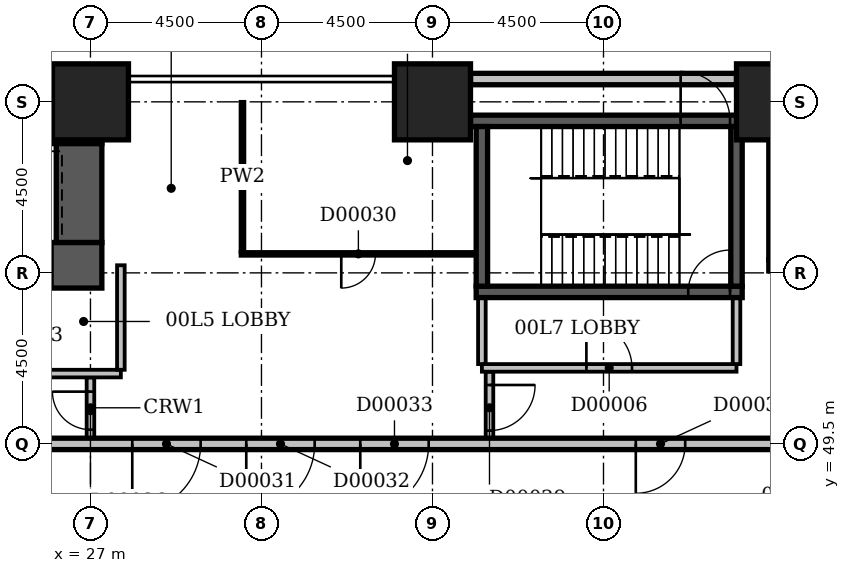
"""IFC4 building model, lengths in metres.
Left out: names, types, materials, properties, quantities, classifications, styles, units other than length and angle.
Written with IfcOpenShell. Run it as: python <this file> out.ifc"""

import sys

from ifc_helpers import new_model, si_unit, direction, frame, frame_2d, origin, origin_2d, place, context, subcontext, project, spatial, rectangle, extrude, element, fill, save


model = new_model("IFC4")
c1 = context("Model", 3, precision=1e-05, world=origin(), true_north=direction((0.0, 1.0)))
c2 = subcontext(c1, "Body", "Model", "MODEL_VIEW")
j1 = project(units=[si_unit("LENGTHUNIT", "METRE"), si_unit("PLANEANGLEUNIT", "RADIAN")], contexts=[c1])
p1 = place(None, origin())
s1 = spatial("IfcSite", under=j1, at=p1, CompositionType="ELEMENT")
p2 = place(p1, origin())
s2 = spatial("IfcBuilding", under=s1, at=p2, CompositionType="ELEMENT")
p3 = place(p2, origin())
s3 = spatial("IfcBuildingStorey", under=s2, at=p3, CompositionType="ELEMENT", Elevation=0.0)
p4 = place(p3, frame((23.6, 54.2, -0.45), z_axis=(0.0, 0.0, 1.0), x_axis=(1.0, 0.0, 0.0)))
e1 = element("IfcWall", 1, at=p4, inside=s3, PredefinedType="SHEAR", context=c2, shape_type="SweptSolid", body=[
    extrude(rectangle(XDim=3.7, YDim=1.2, at=frame_2d((1.85, 0.0))), origin(), (0.0, 0.0, 1.0), 8.85),
])
p5 = place(p4, frame((1.3, 0.0, 0.45)))
e2 = element("IfcOpeningElement", 2, at=p5, cuts=e1, PredefinedType="OPENING", context=c2, shape_type="SweptSolid", body=[
    extrude(rectangle(XDim=1.1, YDim=2.1, at=frame_2d((0.55, 1.05))), frame((0.0, 0.612, 0.0), z_axis=(0.0, -1.0, 0.0), x_axis=(1.0, 0.0, 0.0)), (0.0, 0.0, 1.0), 1.224),
])
p6 = place(p3, frame((23.6, 58.0, -0.45), z_axis=(0.0, 0.0, 1.0), x_axis=(1.0, 0.0, 0.0)))
e3 = element("IfcWall", 3, at=p6, inside=s3, PredefinedType="SHEAR", context=c2, shape_type="SweptSolid", body=[
    extrude(rectangle(XDim=3.7, YDim=1.2, at=frame_2d((1.85, 0.0))), origin(), (0.0, 0.0, 1.0), 8.85),
])
p7 = place(p3, frame((26.7, 54.8, -0.45), z_axis=(0.0, 0.0, 1.0), x_axis=(0.0, 1.0, 0.0)))
e4 = element("IfcWall", 4, at=p7, inside=s3, PredefinedType="SHEAR", context=c2, shape_type="SweptSolid", body=[
    extrude(rectangle(XDim=2.6, YDim=1.2, at=frame_2d((1.3, 0.0))), origin(), (0.0, 0.0, 1.0), 8.85),
])
p8 = place(p3, frame((37.0, 58.0, -0.45), z_axis=(0.0, 0.0, 1.0), x_axis=(1.0, 0.0, 0.0)))
e5 = element("IfcWall", 5, at=p8, inside=s3, PredefinedType="SHEAR", context=c2, shape_type="SweptSolid", body=[
    extrude(rectangle(XDim=7.15, YDim=0.3, at=frame_2d((3.575, 0.0))), origin(), (0.0, 0.0, 1.0), 8.85),
])
p9 = place(p8, frame((5.53, 0.0, 0.45)))
e6 = element("IfcOpeningElement", 6, at=p9, cuts=e5, PredefinedType="OPENING", context=c2, shape_type="SweptSolid", body=[
    extrude(rectangle(XDim=1.3, YDim=2.4, at=frame_2d((0.65, 1.2))), frame((0.0, 0.162, 0.0), z_axis=(0.0, -1.0, 0.0), x_axis=(1.0, 0.0, 0.0)), (0.0, 0.0, 1.0), 0.324),
])
p10 = place(p3, frame((37.15, 53.5, -0.45), z_axis=(0.0, 0.0, 1.0), x_axis=(1.0, 0.0, 0.0)))
e7 = element("IfcWall", 7, at=p10, inside=s3, PredefinedType="SHEAR", context=c2, shape_type="SweptSolid", body=[
    extrude(rectangle(XDim=7.0, YDim=0.3, at=frame_2d((3.5, 0.0))), origin(), (0.0, 0.0, 1.0), 8.85),
])
p11 = place(p10, frame((5.58, 0.0, 0.45)))
e8 = element("IfcOpeningElement", 8, at=p11, cuts=e7, PredefinedType="OPENING", context=c2, shape_type="SweptSolid", body=[
    extrude(rectangle(XDim=1.1, YDim=2.1, at=frame_2d((0.55, 1.05))), frame((0.0, 0.162, 0.0), z_axis=(0.0, -1.0, 0.0), x_axis=(1.0, 0.0, 0.0)), (0.0, 0.0, 1.0), 0.324),
])
for number, where, z_axis, x_axis in (
    (9, (37.3, 53.65, -0.45), (0.0, 0.0, 1.0), (0.0, 1.0, 0.0)),
    (10, (44.0, 53.65, -0.45), (0.0, 0.0, 1.0), (0.0, 1.0, 0.0)),
):
    element("IfcWall", number, at=place(p3, frame(where, z_axis=z_axis, x_axis=x_axis)), inside=s3, PredefinedType="SHEAR", context=c2, shape_type="SweptSolid", body=[
        extrude(rectangle(XDim=4.2, YDim=0.3, at=frame_2d((2.1, 0.0))), origin(), (0.0, 0.0, 1.0), 8.85),
    ])
p12 = place(p3, frame((44.85, 54.2, -0.45), z_axis=(0.0, 0.0, 1.0), x_axis=(1.0, 0.0, 0.0)))
e11 = element("IfcWall", 11, at=p12, inside=s3, PredefinedType="SHEAR", context=c2, shape_type="SweptSolid", body=[
    extrude(rectangle(XDim=2.15, YDim=0.3, at=frame_2d((1.075, 0.0))), origin(), (0.0, 0.0, 1.0), 8.85),
])
p13 = place(p12, frame((0.65, 0.0, 0.45)))
e12 = element("IfcOpeningElement", 12, at=p13, cuts=e11, PredefinedType="OPENING", context=c2, shape_type="SweptSolid", body=[
    extrude(rectangle(XDim=1.0, YDim=2.1, at=frame_2d((0.5, 1.05))), frame((0.0, 0.162, 0.0), z_axis=(0.0, -1.0, 0.0), x_axis=(1.0, 0.0, 0.0)), (0.0, 0.0, 1.0), 0.324),
])
p14 = place(p3, frame((44.85, 58.0, -0.45), z_axis=(0.0, 0.0, 1.0), x_axis=(1.0, 0.0, 0.0)))
e13 = element("IfcWall", 13, at=p14, inside=s3, PredefinedType="SHEAR", context=c2, shape_type="SweptSolid", body=[
    extrude(rectangle(XDim=2.15, YDim=0.3, at=frame_2d((1.075, 0.0))), origin(), (0.0, 0.0, 1.0), 8.85),
])
p15 = place(p3, frame((45.0, 54.35, -0.45), z_axis=(0.0, 0.0, 1.0), x_axis=(0.0, 1.0, 0.0)))
e14 = element("IfcWall", 14, at=p15, inside=s3, PredefinedType="SHEAR", context=c2, shape_type="SweptSolid", body=[
    extrude(rectangle(XDim=3.5, YDim=0.3, at=frame_2d((1.75, 0.0))), origin(), (0.0, 0.0, 1.0), 8.85),
])
for number, where, z_axis, x_axis in (
    (15, (27.0, 58.5, -0.45), (0.0, 0.0, 1.0), (1.0, 0.0, 0.0)),
    (16, (36.0, 58.5, -0.45), (0.0, 0.0, 1.0), (1.0, 0.0, 0.0)),
    (17, (45.0, 58.5, -0.45), (0.0, 0.0, 1.0), (1.0, 0.0, 0.0)),
):
    element("IfcColumn", number, at=place(p3, frame(where, z_axis=z_axis, x_axis=x_axis)), inside=s3, PredefinedType="COLUMN", context=c2, shape_type="SweptSolid", body=[
        extrude(rectangle(XDim=2.0, YDim=2.0, at=origin_2d()), origin(), (0.0, 0.0, 1.0), 8.85),
    ])
p16 = place(p3, frame((44.0, 59.1, 0.0), z_axis=(0.0, 0.0, 1.0), x_axis=(-1.0, 0.0, 0.0)))
e18 = element("IfcWall", 18, at=p16, inside=s3, PredefinedType="STANDARD", context=c2, shape_type="SweptSolid", body=[
    extrude(rectangle(XDim=7.0, YDim=0.3, at=frame_2d((3.5, 0.0))), origin(), (0.0, 0.0, 1.0), 7.2),
])
p17 = place(p3, frame((23.0, 51.35, 0.0), z_axis=(0.0, 0.0, 1.0), x_axis=(1.0, 0.0, 0.0)))
e19 = element("IfcWall", 19, at=p17, inside=s3, PredefinedType="PARTITIONING", context=c2, shape_type="SweptSolid", body=[
    extrude(rectangle(XDim=4.8, YDim=0.2, at=frame_2d((2.4, 0.0))), origin(), (0.0, 0.0, 1.0), 8.4),
])
p18 = place(p17, frame((1.65, 0.0, 0.0)))
e20 = element("IfcOpeningElement", 20, at=p18, cuts=e19, PredefinedType="OPENING", context=c2, shape_type="SweptSolid", body=[
    extrude(rectangle(XDim=1.2, YDim=2.1, at=frame_2d((0.6, 1.05))), frame((0.0, 0.112, 0.0), z_axis=(0.0, -1.0, 0.0), x_axis=(1.0, 0.0, 0.0)), (0.0, 0.0, 1.0), 0.224),
])
p19 = place(p3, frame((27.8, 51.45, 0.0), z_axis=(0.0, 0.0, 1.0), x_axis=(0.0, 1.0, 0.0)))
e21 = element("IfcWall", 21, at=p19, inside=s3, PredefinedType="PARTITIONING", context=c2, shape_type="SweptSolid", body=[
    extrude(rectangle(XDim=2.75, YDim=0.2, at=frame_2d((1.375, 0.0))), origin(), (0.0, 0.0, 1.0), 8.4),
])
p20 = place(p3, frame((37.3, 51.5, 0.0), z_axis=(0.0, 0.0, 1.0), x_axis=(1.0, 0.0, 0.0)))
e22 = element("IfcWall", 22, at=p20, inside=s3, PredefinedType="PARTITIONING", context=c2, shape_type="SweptSolid", body=[
    extrude(rectangle(XDim=6.7, YDim=0.2, at=frame_2d((3.35, 0.0))), origin(), (0.0, 0.0, 1.0), 8.4),
])
p21 = place(p20, frame((2.75, 0.0, 0.0)))
e23 = element("IfcOpeningElement", 23, at=p21, cuts=e22, PredefinedType="OPENING", context=c2, shape_type="SweptSolid", body=[
    extrude(rectangle(XDim=1.2, YDim=2.1, at=frame_2d((0.6, 1.05))), frame((0.0, 0.112, 0.0), z_axis=(0.0, -1.0, 0.0), x_axis=(1.0, 0.0, 0.0)), (0.0, 0.0, 1.0), 0.224),
])
for number, where, z_axis, x_axis in (
    (24, (44.0, 51.6, 0.0), (0.0, 0.0, 1.0), (0.0, 1.0, 0.0)),
    (25, (37.3, 51.6, 0.0), (0.0, 0.0, 1.0), (0.0, 1.0, 0.0)),
):
    element("IfcWall", number, at=place(p3, frame(where, z_axis=z_axis, x_axis=x_axis)), inside=s3, PredefinedType="PARTITIONING", context=c2, shape_type="SweptSolid", body=[
        extrude(rectangle(XDim=1.73, YDim=0.2, at=frame_2d((0.865, 0.0))), origin(), (0.0, 0.0, 1.0), 8.4),
    ])
p22 = place(p3, frame((27.0, 49.65, 0.0), z_axis=(0.0, 0.0, 1.0), x_axis=(0.0, 1.0, 0.0)))
e26 = element("IfcWall", 26, at=p22, inside=s3, PredefinedType="PARTITIONING", context=c2, shape_type="SweptSolid", body=[
    extrude(rectangle(XDim=1.6, YDim=0.2, at=frame_2d((0.8, 0.0))), origin(), (0.0, 0.0, 1.0), 7.7),
])
p23 = place(p22, frame((0.225, 0.0, 0.0)))
e27 = element("IfcOpeningElement", 27, at=p23, cuts=e26, PredefinedType="OPENING", context=c2, shape_type="SweptSolid", body=[
    extrude(rectangle(XDim=1.0, YDim=2.1, at=frame_2d((0.5, 1.05))), frame((0.0, 0.112, 0.0), z_axis=(0.0, -1.0, 0.0), x_axis=(1.0, 0.0, 0.0)), (0.0, 0.0, 1.0), 0.224),
])
p24 = place(p3, frame((37.5, 51.4, 0.0), z_axis=(0.0, 0.0, 1.0), x_axis=(0.0, -1.0, 0.0)))
e28 = element("IfcWall", 28, at=p24, inside=s3, PredefinedType="PARTITIONING", context=c2, shape_type="SweptSolid", body=[
    extrude(rectangle(XDim=1.75, YDim=0.2, at=frame_2d((0.875, 0.0))), origin(), (0.0, 0.0, 1.0), 8.4),
])
p25 = place(p24, frame((0.35, 0.0, 0.0)))
e29 = element("IfcOpeningElement", 29, at=p25, cuts=e28, PredefinedType="OPENING", context=c2, shape_type="SweptSolid", body=[
    extrude(rectangle(XDim=1.2, YDim=2.1, at=frame_2d((0.6, 1.05))), frame((0.0, 0.112, 0.0), z_axis=(0.0, -1.0, 0.0), x_axis=(1.0, 0.0, 0.0)), (0.0, 0.0, 1.0), 0.224),
])
p26 = place(p3, frame((31.0, 54.55, 0.0), z_axis=(0.0, 0.0, 1.0), x_axis=(0.0, 1.0, 0.0)))
e30 = element("IfcWall", 30, at=p26, inside=s3, PredefinedType="PARTITIONING", context=c2, shape_type="SweptSolid", body=[
    extrude(rectangle(XDim=3.95, YDim=0.1, at=frame_2d((1.975, 0.0))), origin(), (0.0, 0.0, 1.0), 8.4),
])
p27 = place(p3, frame((37.15, 54.5, 0.0), z_axis=(0.0, 0.0, 1.0), x_axis=(-1.0, 0.0, 0.0)))
e31 = element("IfcWall", 31, at=p27, inside=s3, PredefinedType="PARTITIONING", context=c2, shape_type="SweptSolid", body=[
    extrude(rectangle(XDim=6.2, YDim=0.1, at=frame_2d((3.1, 0.0))), origin(), (0.0, 0.0, 1.0), 8.4),
])
p28 = place(p27, frame((2.65, 0.0, 0.0)))
e32 = element("IfcOpeningElement", 32, at=p28, cuts=e31, PredefinedType="OPENING", context=c2, shape_type="SweptSolid", body=[
    extrude(rectangle(XDim=0.9, YDim=2.1, at=frame_2d((0.45, 1.05))), frame((0.0, 0.062, 0.0), z_axis=(0.0, -1.0, 0.0), x_axis=(1.0, 0.0, 0.0)), (0.0, 0.0, 1.0), 0.124),
])
p29 = place(p3, frame((9.0, 49.5, 0.0), z_axis=(0.0, 0.0, 1.0), x_axis=(1.0, 0.0, 0.0)))
e33 = element("IfcWall", 33, at=p29, inside=s3, PredefinedType="SOLIDWALL", context=c2, shape_type="SweptSolid", body=[
    extrude(rectangle(XDim=51.5, YDim=0.3, at=frame_2d((25.75, 0.0))), origin(), (0.0, 0.0, 1.0), 8.4),
])
p30 = place(p29, frame((19.1, 0.0, 0.0)))
e34 = element("IfcOpeningElement", 34, at=p30, cuts=e33, PredefinedType="OPENING", context=c2, shape_type="SweptSolid", body=[
    extrude(rectangle(XDim=1.8, YDim=2.4, at=frame_2d((0.9, 1.2))), frame((0.0, 0.162, 0.0), z_axis=(0.0, -1.0, 0.0), x_axis=(1.0, 0.0, 0.0)), (0.0, 0.0, 1.0), 0.324),
])
p31 = place(p29, frame((22.1, 0.0, 0.0)))
e35 = element("IfcOpeningElement", 35, at=p31, cuts=e33, PredefinedType="OPENING", context=c2, shape_type="SweptSolid", body=[
    extrude(rectangle(XDim=1.8, YDim=2.4, at=frame_2d((0.9, 1.2))), frame((0.0, 0.162, 0.0), z_axis=(0.0, -1.0, 0.0), x_axis=(1.0, 0.0, 0.0)), (0.0, 0.0, 1.0), 0.324),
])
p32 = place(p29, frame((25.1, 0.0, 0.0)))
e36 = element("IfcOpeningElement", 36, at=p32, cuts=e33, PredefinedType="OPENING", context=c2, shape_type="SweptSolid", body=[
    extrude(rectangle(XDim=1.8, YDim=2.4, at=frame_2d((0.9, 1.2))), frame((0.0, 0.162, 0.0), z_axis=(0.0, -1.0, 0.0), x_axis=(1.0, 0.0, 0.0)), (0.0, 0.0, 1.0), 0.324),
])
p33 = place(p29, frame((40.35, 0.0, 0.0)))
e37 = element("IfcOpeningElement", 37, at=p33, cuts=e33, PredefinedType="OPENING", context=c2, shape_type="SweptSolid", body=[
    extrude(rectangle(XDim=1.3, YDim=2.4, at=frame_2d((0.65, 1.2))), frame((0.0, 0.162, 0.0), z_axis=(0.0, -1.0, 0.0), x_axis=(1.0, 0.0, 0.0)), (0.0, 0.0, 1.0), 0.324),
])
p34 = place(p29, frame((32.35, 0.0, 0.0)))
e38 = element("IfcOpeningElement", 38, at=p34, cuts=e33, PredefinedType="OPENING", context=c2, shape_type="SweptSolid", body=[
    extrude(rectangle(XDim=1.3, YDim=2.4, at=frame_2d((0.65, 1.2))), frame((0.0, 0.162, 0.0), z_axis=(0.0, -1.0, 0.0), x_axis=(1.0, 0.0, 0.0)), (0.0, 0.0, 1.0), 0.324),
])
p35 = place(p29, frame((48.35, 0.0, 0.0)))
e39 = element("IfcOpeningElement", 39, at=p35, cuts=e33, PredefinedType="OPENING", context=c2, shape_type="SweptSolid", body=[
    extrude(rectangle(XDim=1.3, YDim=2.4, at=frame_2d((0.65, 1.2))), frame((0.0, 0.162, 0.0), z_axis=(0.0, -1.0, 0.0), x_axis=(1.0, 0.0, 0.0)), (0.0, 0.0, 1.0), 0.324),
])
p36 = place(p29, frame((1.35, 0.0, 0.0)))
e40 = element("IfcOpeningElement", 40, at=p36, cuts=e33, PredefinedType="OPENING", context=c2, shape_type="SweptSolid", body=[
    extrude(rectangle(XDim=1.3, YDim=2.4, at=frame_2d((0.65, 1.2))), frame((0.0, 0.162, 0.0), z_axis=(0.0, -1.0, 0.0), x_axis=(1.0, 0.0, 0.0)), (0.0, 0.0, 1.0), 0.324),
])
p37 = place(p29, frame((7.35, 0.0, 0.0)))
e41 = element("IfcOpeningElement", 41, at=p37, cuts=e33, PredefinedType="OPENING", context=c2, shape_type="SweptSolid", body=[
    extrude(rectangle(XDim=1.3, YDim=2.4, at=frame_2d((0.65, 1.2))), frame((0.0, 0.162, 0.0), z_axis=(0.0, -1.0, 0.0), x_axis=(1.0, 0.0, 0.0)), (0.0, 0.0, 1.0), 0.324),
])
p38 = place(p29, frame((45.35, 0.0, 0.0)))
e42 = element("IfcOpeningElement", 42, at=p38, cuts=e33, PredefinedType="OPENING", context=c2, shape_type="SweptSolid", body=[
    extrude(rectangle(XDim=1.3, YDim=2.4, at=frame_2d((0.65, 1.2))), frame((0.0, 0.162, 0.0), z_axis=(0.0, -1.0, 0.0), x_axis=(1.0, 0.0, 0.0)), (0.0, 0.0, 1.0), 0.324),
])
p39 = place(p5, origin())
e43 = element("IfcDoor", 43, at=p39, inside=s3, OperationType="SLIDING_TO_LEFT", PredefinedType="DOOR", context=c2, shape_type="SweptSolid", body=[
    extrude(rectangle(XDim=1.1, YDim=2.1, at=frame_2d((0.55, 1.05))), frame((0.0, 0.025, 0.0), z_axis=(0.0, -1.0, 0.0), x_axis=(1.0, 0.0, 0.0)), (0.0, 0.0, 1.0), 0.05),
])
fill(e2, e43)
p40 = place(p21, origin())
e44 = element("IfcDoor", 44, at=p40, inside=s3, OperationType="SINGLE_SWING_LEFT", PredefinedType="DOOR", context=c2, shape_type="SweptSolid", body=[
    extrude(rectangle(XDim=1.2, YDim=2.1, at=frame_2d((0.6, 1.05))), frame((0.0, 0.025, 0.0), z_axis=(0.0, -1.0, 0.0), x_axis=(1.0, 0.0, 0.0)), (0.0, 0.0, 1.0), 0.05),
])
fill(e23, e44)
p41 = place(p11, frame((1.1, 0.0, 0.0), z_axis=(0.0, 0.0, 1.0), x_axis=(-1.0, 0.0, 0.0)))
e45 = element("IfcDoor", 45, at=p41, inside=s3, OperationType="SINGLE_SWING_LEFT", PredefinedType="DOOR", context=c2, shape_type="SweptSolid", body=[
    extrude(rectangle(XDim=1.1, YDim=2.1, at=frame_2d((0.55, 1.05))), frame((0.0, 0.025, 0.0), z_axis=(0.0, -1.0, 0.0), x_axis=(1.0, 0.0, 0.0)), (0.0, 0.0, 1.0), 0.05),
])
fill(e8, e45)
p42 = place(p9, origin())
e46 = element("IfcDoor", 46, at=p42, inside=s3, OperationType="SINGLE_SWING_LEFT", PredefinedType="DOOR", context=c2, shape_type="SweptSolid", body=[
    extrude(rectangle(XDim=1.3, YDim=2.4, at=frame_2d((0.65, 1.2))), frame((0.0, 0.025, 0.0), z_axis=(0.0, -1.0, 0.0), x_axis=(1.0, 0.0, 0.0)), (0.0, 0.0, 1.0), 0.05),
])
fill(e6, e46)
p43 = place(p23, frame((1.0, 0.0, 0.0), z_axis=(0.0, 0.0, 1.0), x_axis=(-1.0, 0.0, 0.0)))
e47 = element("IfcDoor", 47, at=p43, inside=s3, OperationType="SINGLE_SWING_LEFT", PredefinedType="DOOR", context=c2, shape_type="SweptSolid", body=[
    extrude(rectangle(XDim=1.0, YDim=2.1, at=frame_2d((0.5, 1.05))), frame((0.0, 0.025, 0.0), z_axis=(0.0, -1.0, 0.0), x_axis=(1.0, 0.0, 0.0)), (0.0, 0.0, 1.0), 0.05),
])
fill(e27, e47)
p44 = place(p25, origin())
e48 = element("IfcDoor", 48, at=p44, inside=s3, OperationType="SINGLE_SWING_LEFT", PredefinedType="DOOR", context=c2, shape_type="SweptSolid", body=[
    extrude(rectangle(XDim=1.2, YDim=2.1, at=frame_2d((0.6, 1.05))), frame((0.0, 0.025, 0.0), z_axis=(0.0, -1.0, 0.0), x_axis=(1.0, 0.0, 0.0)), (0.0, 0.0, 1.0), 0.05),
])
fill(e29, e48)
p45 = place(p28, frame((0.9, 0.0, 0.0), z_axis=(0.0, 0.0, 1.0), x_axis=(-1.0, 0.0, 0.0)))
e49 = element("IfcDoor", 49, at=p45, inside=s3, OperationType="SINGLE_SWING_LEFT", PredefinedType="DOOR", context=c2, shape_type="SweptSolid", body=[
    extrude(rectangle(XDim=0.9, YDim=2.1, at=frame_2d((0.45, 1.05))), frame((0.0, 0.025, 0.0), z_axis=(0.0, -1.0, 0.0), x_axis=(1.0, 0.0, 0.0)), (0.0, 0.0, 1.0), 0.05),
])
fill(e32, e49)
p46 = place(p30, frame((1.8, 0.0, 0.0), z_axis=(0.0, 0.0, 1.0), x_axis=(-1.0, 0.0, 0.0)))
e50 = element("IfcDoor", 50, at=p46, inside=s3, OperationType="DOUBLE_DOOR_DOUBLE_SWING", PredefinedType="DOOR", context=c2, shape_type="SweptSolid", body=[
    extrude(rectangle(XDim=1.8, YDim=2.4, at=frame_2d((0.9, 1.2))), frame((0.0, 0.025, 0.0), z_axis=(0.0, -1.0, 0.0), x_axis=(1.0, 0.0, 0.0)), (0.0, 0.0, 1.0), 0.05),
])
fill(e34, e50)
p47 = place(p31, frame((1.8, 0.0, 0.0), z_axis=(0.0, 0.0, 1.0), x_axis=(-1.0, 0.0, 0.0)))
e51 = element("IfcDoor", 51, at=p47, inside=s3, OperationType="DOUBLE_DOOR_DOUBLE_SWING", PredefinedType="DOOR", context=c2, shape_type="SweptSolid", body=[
    extrude(rectangle(XDim=1.8, YDim=2.4, at=frame_2d((0.9, 1.2))), frame((0.0, 0.025, 0.0), z_axis=(0.0, -1.0, 0.0), x_axis=(1.0, 0.0, 0.0)), (0.0, 0.0, 1.0), 0.05),
])
fill(e35, e51)
p48 = place(p32, frame((1.8, 0.0, 0.0), z_axis=(0.0, 0.0, 1.0), x_axis=(-1.0, 0.0, 0.0)))
e52 = element("IfcDoor", 52, at=p48, inside=s3, OperationType="DOUBLE_DOOR_DOUBLE_SWING", PredefinedType="DOOR", context=c2, shape_type="SweptSolid", body=[
    extrude(rectangle(XDim=1.8, YDim=2.4, at=frame_2d((0.9, 1.2))), frame((0.0, 0.025, 0.0), z_axis=(0.0, -1.0, 0.0), x_axis=(1.0, 0.0, 0.0)), (0.0, 0.0, 1.0), 0.05),
])
fill(e36, e52)
p49 = place(p34, frame((1.3, 0.0, 0.0), z_axis=(0.0, 0.0, 1.0), x_axis=(-1.0, 0.0, 0.0)))
e53 = element("IfcDoor", 53, at=p49, inside=s3, OperationType="SINGLE_SWING_RIGHT", PredefinedType="DOOR", context=c2, shape_type="SweptSolid", body=[
    extrude(rectangle(XDim=1.3, YDim=2.4, at=frame_2d((0.65, 1.2))), frame((0.0, 0.025, 0.0), z_axis=(0.0, -1.0, 0.0), x_axis=(1.0, 0.0, 0.0)), (0.0, 0.0, 1.0), 0.05),
])
fill(e38, e53)
save(model, sys.argv[1])
